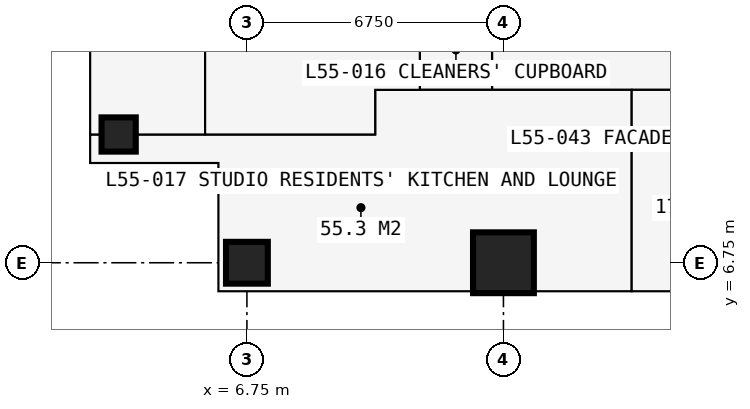
"""IFC4 building model, lengths in metres.
Left out: names, types, materials, properties, quantities, classifications, styles, units other than length and angle.
Written with IfcOpenShell. Run it as: python <this file> out.ifc"""

import sys

from ifc_helpers import new_model, si_unit, direction, frame, frame_2d, origin, origin_2d, place, context, subcontext, project, spatial, rectangle, extrude, element, fill, save


model = new_model("IFC4")
c1 = context("Model", 3, precision=1e-05, world=origin(), true_north=direction((0.0, 1.0)))
c2 = subcontext(c1, "Body", "Model", "MODEL_VIEW")
j1 = project(units=[si_unit("LENGTHUNIT", "METRE"), si_unit("PLANEANGLEUNIT", "RADIAN")], contexts=[c1])
p1 = place(None, origin())
s1 = spatial("IfcSite", under=j1, at=p1, CompositionType="ELEMENT")
p2 = place(p1, origin())
s2 = spatial("IfcBuilding", under=s1, at=p2, CompositionType="ELEMENT")
p3 = place(p2, frame((0.0, 0.0, 204.3)))
s3 = spatial("IfcBuildingStorey", under=s2, at=p3, CompositionType="ELEMENT", Elevation=204.3)
p4 = place(p3, frame((3.375, 10.125, 0.0), z_axis=(0.0, 0.0, 1.0), x_axis=(1.0, 0.0, 0.0)))
e1 = element("IfcColumn", 1, at=p4, inside=s3, PredefinedType="COLUMN", context=c2, shape_type="SweptSolid", body=[
    extrude(rectangle(XDim=0.9, YDim=0.9, at=origin_2d()), origin(), (0.0, 0.0, 1.0), 3.6),
])
p5 = place(p3, frame((6.75, 6.75, 0.0), z_axis=(0.0, 0.0, 1.0), x_axis=(1.0, 0.0, 0.0)))
e2 = element("IfcColumn", 2, at=p5, inside=s3, PredefinedType="COLUMN", context=c2, shape_type="SweptSolid", body=[
    extrude(rectangle(XDim=1.1, YDim=1.1, at=origin_2d()), origin(), (0.0, 0.0, 1.0), 3.6),
])
p6 = place(p3, frame((13.5, 6.75, 0.0), z_axis=(0.0, 0.0, 1.0), x_axis=(1.0, 0.0, 0.0)))
e3 = element("IfcColumn", 3, at=p6, inside=s3, PredefinedType="COLUMN", context=c2, shape_type="SweptSolid", body=[
    extrude(rectangle(XDim=1.6, YDim=1.6, at=origin_2d()), origin(), (0.0, 0.0, 1.0), 3.6),
])
p7 = place(p3, frame((2.625, 12.75, 0.0), z_axis=(0.0, 0.0, 1.0), x_axis=(0.0, -1.0, 0.0)))
e4 = element("IfcWall", 4, at=p7, inside=s3, PredefinedType="SOLIDWALL", context=c2, shape_type="SweptSolid", body=[
    extrude(rectangle(XDim=3.375, YDim=0.3, at=frame_2d((1.688, 0.0))), origin(), (0.0, 0.0, 1.0), 3.375),
])
p8 = place(p7, frame((0.788, 0.0, 0.6)))
e5 = element("IfcOpeningElement", 5, at=p8, cuts=e4, PredefinedType="OPENING", context=c2, shape_type="SweptSolid", body=[
    extrude(rectangle(XDim=1.8, YDim=2.1, at=frame_2d((0.9, 1.05))), frame((0.0, 0.16, 0.0), z_axis=(0.0, -1.0, 0.0), x_axis=(1.0, 0.0, 0.0)), (0.0, 0.0, 1.0), 0.32),
])
p9 = place(p3, frame((2.625, 9.375, 0.0), z_axis=(0.0, 0.0, 1.0), x_axis=(1.0, 0.0, 0.0)))
e6 = element("IfcWall", 6, at=p9, inside=s3, PredefinedType="SOLIDWALL", context=c2, shape_type="SweptSolid", body=[
    extrude(rectangle(XDim=3.375, YDim=0.3, at=frame_2d((1.688, 0.0))), origin(), (0.0, 0.0, 1.0), 3.375),
])
p10 = place(p9, frame((0.788, 0.0, 0.6)))
e7 = element("IfcOpeningElement", 7, at=p10, cuts=e6, PredefinedType="OPENING", context=c2, shape_type="SweptSolid", body=[
    extrude(rectangle(XDim=1.8, YDim=2.1, at=frame_2d((0.9, 1.05))), frame((0.0, 0.16, 0.0), z_axis=(0.0, -1.0, 0.0), x_axis=(1.0, 0.0, 0.0)), (0.0, 0.0, 1.0), 0.32),
])
p11 = place(p3, frame((6.0, 9.375, 0.0), z_axis=(0.0, 0.0, 1.0), x_axis=(0.0, -1.0, 0.0)))
e8 = element("IfcWall", 8, at=p11, inside=s3, PredefinedType="SOLIDWALL", context=c2, shape_type="SweptSolid", body=[
    extrude(rectangle(XDim=3.375, YDim=0.3, at=frame_2d((1.688, 0.0))), origin(), (0.0, 0.0, 1.0), 3.375),
])
p12 = place(p11, frame((0.788, 0.0, 0.6)))
e9 = element("IfcOpeningElement", 9, at=p12, cuts=e8, PredefinedType="OPENING", context=c2, shape_type="SweptSolid", body=[
    extrude(rectangle(XDim=1.8, YDim=2.1, at=frame_2d((0.9, 1.05))), frame((0.0, 0.16, 0.0), z_axis=(0.0, -1.0, 0.0), x_axis=(1.0, 0.0, 0.0)), (0.0, 0.0, 1.0), 0.32),
])
p13 = place(p3, frame((20.25, 6.0, 0.0), z_axis=(0.0, 0.0, 1.0), x_axis=(-1.0, 0.0, 0.0)))
e10 = element("IfcWall", 10, at=p13, inside=s3, PredefinedType="SOLIDWALL", context=c2, shape_type="SweptSolid", body=[
    extrude(rectangle(XDim=6.75, YDim=0.15, at=frame_2d((3.375, 0.0))), origin(), (0.0, 0.0, 1.0), 3.375),
])
p14 = place(p13, frame((0.363, 0.0, 0.0)))
e11 = element("IfcOpeningElement", 11, at=p14, cuts=e10, PredefinedType="OPENING", context=c2, shape_type="SweptSolid", body=[
    extrude(rectangle(XDim=1.0, YDim=2.2, at=frame_2d((0.5, 1.1))), frame((0.0, 0.085, 0.0), z_axis=(0.0, -1.0, 0.0), x_axis=(1.0, 0.0, 0.0)), (0.0, 0.0, 1.0), 0.17),
])
p15 = place(p13, frame((1.725, 0.0, 0.9)))
e12 = element("IfcOpeningElement", 12, at=p15, cuts=e10, PredefinedType="OPENING", context=c2, shape_type="SweptSolid", body=[
    extrude(rectangle(XDim=1.2, YDim=1.8, at=frame_2d((0.6, 0.9))), frame((0.0, 0.085, 0.0), z_axis=(0.0, -1.0, 0.0), x_axis=(1.0, 0.0, 0.0)), (0.0, 0.0, 1.0), 0.17),
])
p16 = place(p13, frame((4.854, 0.0, 0.0)))
e13 = element("IfcOpeningElement", 13, at=p16, cuts=e10, PredefinedType="OPENING", context=c2, shape_type="SweptSolid", body=[
    extrude(rectangle(XDim=1.0, YDim=2.2, at=frame_2d((0.5, 1.1))), frame((0.0, 0.085, 0.0), z_axis=(0.0, -1.0, 0.0), x_axis=(1.0, 0.0, 0.0)), (0.0, 0.0, 1.0), 0.17),
])
p17 = place(p13, frame((3.558, 0.0, 0.9)))
e14 = element("IfcOpeningElement", 14, at=p17, cuts=e10, PredefinedType="OPENING", context=c2, shape_type="SweptSolid", body=[
    extrude(rectangle(XDim=1.2, YDim=1.8, at=frame_2d((0.6, 0.9))), frame((0.0, 0.085, 0.0), z_axis=(0.0, -1.0, 0.0), x_axis=(1.0, 0.0, 0.0)), (0.0, 0.0, 1.0), 0.17),
])
p18 = place(p3, frame((2.775, 10.125, 0.0), z_axis=(0.0, 0.0, 1.0), x_axis=(1.0, 0.0, 0.0)))
e15 = element("IfcWall", 15, at=p18, inside=s3, PredefinedType="PARTITIONING", context=c2, shape_type="SweptSolid", body=[
    extrude(rectangle(XDim=7.35, YDim=0.15, at=frame_2d((3.675, 0.0))), origin(), (0.0, 0.0, 1.0), 2.877),
])
p19 = place(p18, frame((1.066, 0.0, 0.0)))
e16 = element("IfcOpeningElement", 16, at=p19, cuts=e15, PredefinedType="OPENING", context=c2, shape_type="SweptSolid", body=[
    extrude(rectangle(XDim=1.0, YDim=2.2, at=frame_2d((0.5, 1.1))), frame((0.0, 0.085, 0.0), z_axis=(0.0, -1.0, 0.0), x_axis=(1.0, 0.0, 0.0)), (0.0, 0.0, 1.0), 0.17),
])
p20 = place(p3, frame((5.65, 10.125, 0.0), z_axis=(0.0, 0.0, 1.0), x_axis=(0.0, 1.0, 0.0)))
e17 = element("IfcWall", 17, at=p20, inside=s3, PredefinedType="PARTITIONING", context=c2, shape_type="SweptSolid", body=[
    extrude(rectangle(XDim=10.762, YDim=0.15, at=frame_2d((5.381, 0.0))), origin(), (0.0, 0.0, 1.0), 3.375),
])
p21 = place(p20, frame((4.9, 0.0, 0.0)))
e18 = element("IfcOpeningElement", 18, at=p21, cuts=e17, PredefinedType="OPENING", context=c2, shape_type="SweptSolid", body=[
    extrude(rectangle(XDim=0.95, YDim=2.2, at=frame_2d((0.475, 1.1))), frame((0.0, 0.085, 0.0), z_axis=(0.0, -1.0, 0.0), x_axis=(1.0, 0.0, 0.0)), (0.0, 0.0, 1.0), 0.17),
])
p22 = place(p3, frame((10.125, 10.125, 0.0), z_axis=(0.0, 0.0, 1.0), x_axis=(0.0, 1.0, 0.0)))
e19 = element("IfcWall", 19, at=p22, inside=s3, PredefinedType="PARTITIONING", context=c2, shape_type="SweptSolid", body=[
    extrude(rectangle(XDim=1.175, YDim=0.15, at=frame_2d((0.587, 0.0))), origin(), (0.0, 0.0, 1.0), 3.375),
])
p23 = place(p3, frame((10.125, 11.3, 0.0), z_axis=(0.0, 0.0, 1.0), x_axis=(1.0, 0.0, 0.0)))
e20 = element("IfcWall", 20, at=p23, inside=s3, PredefinedType="PARTITIONING", context=c2, shape_type="SweptSolid", body=[
    extrude(rectangle(XDim=20.25, YDim=0.15, at=frame_2d((10.125, 0.0))), origin(), (0.0, 0.0, 1.0), 3.375),
])
p24 = place(p23, frame((11.725, 0.0, 0.0)))
e21 = element("IfcOpeningElement", 21, at=p24, cuts=e20, PredefinedType="OPENING", context=c2, shape_type="SweptSolid", body=[
    extrude(rectangle(XDim=0.95, YDim=2.2, at=frame_2d((0.475, 1.1))), frame((0.0, 0.085, 0.0), z_axis=(0.0, -1.0, 0.0), x_axis=(1.0, 0.0, 0.0)), (0.0, 0.0, 1.0), 0.17),
])
p25 = place(p23, frame((17.475, 0.0, 0.0)))
e22 = element("IfcOpeningElement", 22, at=p25, cuts=e20, PredefinedType="OPENING", context=c2, shape_type="SweptSolid", body=[
    extrude(rectangle(XDim=1.0, YDim=2.2, at=frame_2d((0.5, 1.1))), frame((0.0, 0.085, 0.0), z_axis=(0.0, -1.0, 0.0), x_axis=(1.0, 0.0, 0.0)), (0.0, 0.0, 1.0), 0.17),
])
p26 = place(p23, frame((7.95, 0.0, 0.0)))
e23 = element("IfcOpeningElement", 23, at=p26, cuts=e20, PredefinedType="OPENING", context=c2, shape_type="SweptSolid", body=[
    extrude(rectangle(XDim=0.95, YDim=2.2, at=frame_2d((0.475, 1.1))), frame((0.0, 0.085, 0.0), z_axis=(0.0, -1.0, 0.0), x_axis=(1.0, 0.0, 0.0)), (0.0, 0.0, 1.0), 0.17),
])
p27 = place(p3, frame((11.3, 11.3, 0.0), z_axis=(0.0, 0.0, 1.0), x_axis=(0.0, 1.0, 0.0)))
e24 = element("IfcWall", 24, at=p27, inside=s3, PredefinedType="PARTITIONING", context=c2, shape_type="SweptSolid", body=[
    extrude(rectangle(XDim=19.3, YDim=0.15, at=frame_2d((9.65, 0.0))), origin(), (0.0, 0.0, 1.0), 3.375),
])
p28 = place(p27, frame((18.1, 0.0, 0.0)))
e25 = element("IfcOpeningElement", 25, at=p28, cuts=e24, PredefinedType="OPENING", context=c2, shape_type="SweptSolid", body=[
    extrude(rectangle(XDim=1.0, YDim=2.2, at=frame_2d((0.5, 1.1))), frame((0.0, 0.085, 0.0), z_axis=(0.0, -1.0, 0.0), x_axis=(1.0, 0.0, 0.0)), (0.0, 0.0, 1.0), 0.17),
])
p29 = place(p27, frame((10.137, 0.0, 0.0)))
e26 = element("IfcOpeningElement", 26, at=p29, cuts=e24, PredefinedType="OPENING", context=c2, shape_type="SweptSolid", body=[
    extrude(rectangle(XDim=1.0, YDim=2.2, at=frame_2d((0.5, 1.1))), frame((0.0, 0.085, 0.0), z_axis=(0.0, -1.0, 0.0), x_axis=(1.0, 0.0, 0.0)), (0.0, 0.0, 1.0), 0.17),
])
p30 = place(p3, frame((13.2, 11.3, 0.0), z_axis=(0.0, 0.0, 1.0), x_axis=(0.0, 1.0, 0.0)))
e27 = element("IfcWall", 27, at=p30, inside=s3, PredefinedType="PARTITIONING", context=c2, shape_type="SweptSolid", body=[
    extrude(rectangle(XDim=1.6, YDim=0.15, at=frame_2d((0.8, 0.0))), origin(), (0.0, 0.0, 1.0), 3.375),
])
p31 = place(p3, frame((16.875, 6.016, 0.0), z_axis=(0.0, 0.0, 1.0), x_axis=(0.0, 1.0, 0.0)))
e28 = element("IfcWall", 28, at=p31, inside=s3, PredefinedType="PARTITIONING", context=c2, shape_type="SweptSolid", body=[
    extrude(rectangle(XDim=5.284, YDim=0.15, at=frame_2d((2.642, 0.0))), origin(), (0.0, 0.0, 1.0), 3.375),
])
p32 = place(p8, origin())
e29 = element("IfcWindow", 29, at=p32, inside=s3, PartitioningType="SINGLE_PANEL", PredefinedType="WINDOW", context=c2, shape_type="SweptSolid", body=[
    extrude(rectangle(XDim=1.8, YDim=2.1, at=frame_2d((0.9, 1.05))), frame((0.0, 0.03, 0.0), z_axis=(0.0, -1.0, 0.0), x_axis=(1.0, 0.0, 0.0)), (0.0, 0.0, 1.0), 0.06),
])
fill(e5, e29)
p33 = place(p10, origin())
e30 = element("IfcWindow", 30, at=p33, inside=s3, PartitioningType="SINGLE_PANEL", PredefinedType="WINDOW", context=c2, shape_type="SweptSolid", body=[
    extrude(rectangle(XDim=1.8, YDim=2.1, at=frame_2d((0.9, 1.05))), frame((0.0, 0.03, 0.0), z_axis=(0.0, -1.0, 0.0), x_axis=(1.0, 0.0, 0.0)), (0.0, 0.0, 1.0), 0.06),
])
fill(e7, e30)
p34 = place(p12, origin())
e31 = element("IfcWindow", 31, at=p34, inside=s3, PartitioningType="SINGLE_PANEL", PredefinedType="WINDOW", context=c2, shape_type="SweptSolid", body=[
    extrude(rectangle(XDim=1.8, YDim=2.1, at=frame_2d((0.9, 1.05))), frame((0.0, 0.03, 0.0), z_axis=(0.0, -1.0, 0.0), x_axis=(1.0, 0.0, 0.0)), (0.0, 0.0, 1.0), 0.06),
])
fill(e9, e31)
p35 = place(p15, origin())
e32 = element("IfcWindow", 32, at=p35, inside=s3, PartitioningType="SINGLE_PANEL", PredefinedType="WINDOW", context=c2, shape_type="SweptSolid", body=[
    extrude(rectangle(XDim=1.2, YDim=1.8, at=frame_2d((0.6, 0.9))), frame((0.0, 0.03, 0.0), z_axis=(0.0, -1.0, 0.0), x_axis=(1.0, 0.0, 0.0)), (0.0, 0.0, 1.0), 0.06),
])
fill(e12, e32)
p36 = place(p16, origin())
e33 = element("IfcDoor", 33, at=p36, inside=s3, OperationType="SINGLE_SWING_RIGHT", PredefinedType="DOOR", context=c2, shape_type="SweptSolid", body=[
    extrude(rectangle(XDim=1.0, YDim=2.2, at=frame_2d((0.5, 1.1))), frame((0.0, 0.025, 0.0), z_axis=(0.0, -1.0, 0.0), x_axis=(1.0, 0.0, 0.0)), (0.0, 0.0, 1.0), 0.05),
])
fill(e13, e33)
p37 = place(p17, origin())
e34 = element("IfcWindow", 34, at=p37, inside=s3, PartitioningType="SINGLE_PANEL", PredefinedType="WINDOW", context=c2, shape_type="SweptSolid", body=[
    extrude(rectangle(XDim=1.2, YDim=1.8, at=frame_2d((0.6, 0.9))), frame((0.0, 0.03, 0.0), z_axis=(0.0, -1.0, 0.0), x_axis=(1.0, 0.0, 0.0)), (0.0, 0.0, 1.0), 0.06),
])
fill(e14, e34)
p38 = place(p19, origin())
e35 = element("IfcDoor", 35, at=p38, inside=s3, OperationType="SINGLE_SWING_LEFT", PredefinedType="DOOR", context=c2, shape_type="SweptSolid", body=[
    extrude(rectangle(XDim=1.0, YDim=2.2, at=frame_2d((0.5, 1.1))), frame((0.0, 0.025, 0.0), z_axis=(0.0, -1.0, 0.0), x_axis=(1.0, 0.0, 0.0)), (0.0, 0.0, 1.0), 0.05),
])
fill(e16, e35)
save(model, sys.argv[1])
